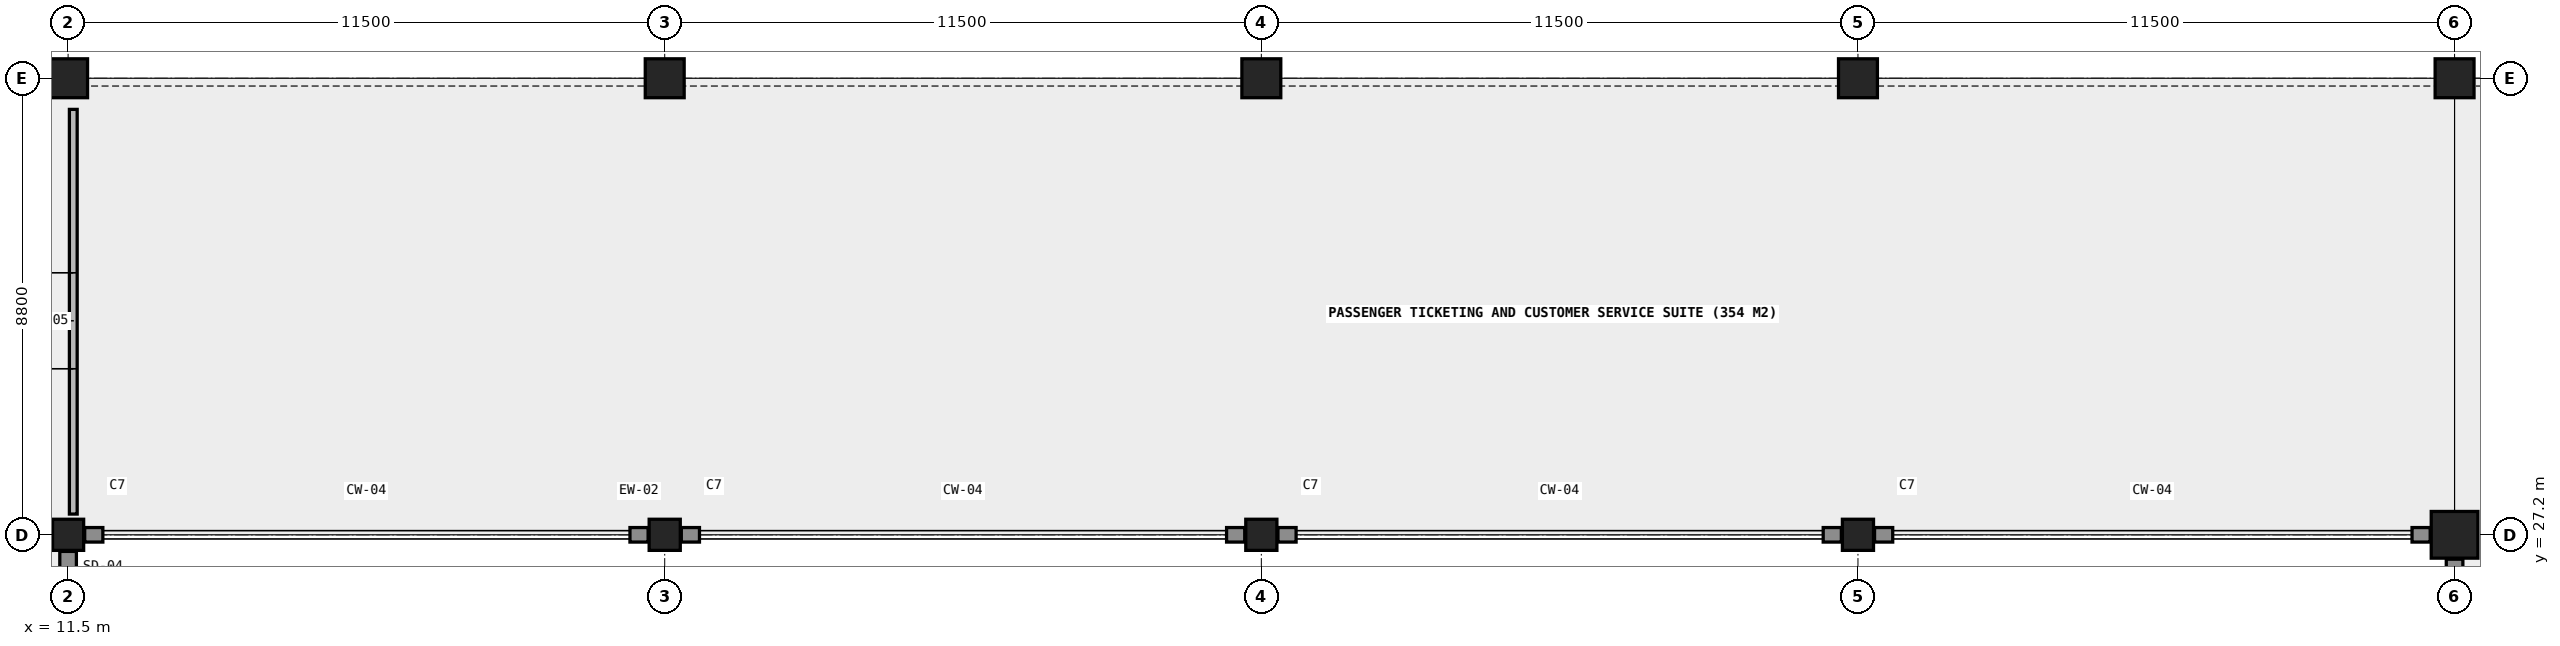
"""IFC4 building model, lengths in metres.
Left out: names, types, materials, properties, quantities, classifications, styles, units other than length and angle.
Written with IfcOpenShell. Run it as: python <this file> out.ifc"""

import sys

from ifc_helpers import new_model, si_unit, direction, frame, frame_2d, origin, origin_2d, place, context, subcontext, project, spatial, rectangle, circle, extrude, element, fill, save


model = new_model("IFC4")
c1 = context("Model", 3, precision=1e-05, world=origin(), true_north=direction((0.0, 1.0)))
c2 = subcontext(c1, "Body", "Model", "MODEL_VIEW")
j1 = project(units=[si_unit("LENGTHUNIT", "METRE"), si_unit("PLANEANGLEUNIT", "RADIAN")], contexts=[c1])
p1 = place(None, origin())
s1 = spatial("IfcSite", under=j1, at=p1, CompositionType="ELEMENT")
p2 = place(p1, origin())
s2 = spatial("IfcBuilding", under=s1, at=p2, CompositionType="ELEMENT")
p3 = place(p2, frame((0.0, 0.0, 4.2)))
s3 = spatial("IfcBuildingStorey", under=s2, at=p3, CompositionType="ELEMENT", Elevation=4.2)
p4 = place(p3, frame((11.5, 27.2, 0.0), z_axis=(0.0, 0.0, 1.0), x_axis=(1.0, 0.0, 0.0)))
e1 = element("IfcColumn", 1, at=p4, inside=s3, PredefinedType="COLUMN", context=c2, shape_type="SweptSolid", body=[
    extrude(rectangle(XDim=0.6, YDim=0.6, at=origin_2d()), origin(), (0.0, 0.0, 1.0), 4.2),
])
p5 = place(p3, frame((11.5, 36.0, 0.0), z_axis=(0.0, 0.0, 1.0), x_axis=(1.0, 0.0, 0.0)))
e2 = element("IfcColumn", 2, at=p5, inside=s3, PredefinedType="COLUMN", context=c2, shape_type="SweptSolid", body=[
    extrude(rectangle(XDim=0.75, YDim=0.75, at=origin_2d()), origin(), (0.0, 0.0, 1.0), 4.2),
])
p6 = place(p3, frame((23.0, 27.2, 0.0), z_axis=(0.0, 0.0, 1.0), x_axis=(1.0, 0.0, 0.0)))
e3 = element("IfcColumn", 3, at=p6, inside=s3, PredefinedType="COLUMN", context=c2, shape_type="SweptSolid", body=[
    extrude(rectangle(XDim=0.6, YDim=0.6, at=origin_2d()), origin(), (0.0, 0.0, 1.0), 4.2),
])
p7 = place(p3, frame((23.0, 36.0, 0.0), z_axis=(0.0, 0.0, 1.0), x_axis=(1.0, 0.0, 0.0)))
e4 = element("IfcColumn", 4, at=p7, inside=s3, PredefinedType="COLUMN", context=c2, shape_type="SweptSolid", body=[
    extrude(rectangle(XDim=0.75, YDim=0.75, at=origin_2d()), origin(), (0.0, 0.0, 1.0), 4.2),
])
p8 = place(p3, frame((34.5, 27.2, 0.0), z_axis=(0.0, 0.0, 1.0), x_axis=(1.0, 0.0, 0.0)))
e5 = element("IfcColumn", 5, at=p8, inside=s3, PredefinedType="COLUMN", context=c2, shape_type="SweptSolid", body=[
    extrude(rectangle(XDim=0.6, YDim=0.6, at=origin_2d()), origin(), (0.0, 0.0, 1.0), 4.2),
])
p9 = place(p3, frame((34.5, 36.0, 0.0), z_axis=(0.0, 0.0, 1.0), x_axis=(1.0, 0.0, 0.0)))
e6 = element("IfcColumn", 6, at=p9, inside=s3, PredefinedType="COLUMN", context=c2, shape_type="SweptSolid", body=[
    extrude(rectangle(XDim=0.75, YDim=0.75, at=origin_2d()), origin(), (0.0, 0.0, 1.0), 4.2),
])
p10 = place(p3, frame((46.0, 27.2, 0.0), z_axis=(0.0, 0.0, 1.0), x_axis=(1.0, 0.0, 0.0)))
e7 = element("IfcColumn", 7, at=p10, inside=s3, PredefinedType="COLUMN", context=c2, shape_type="SweptSolid", body=[
    extrude(rectangle(XDim=0.6, YDim=0.6, at=origin_2d()), origin(), (0.0, 0.0, 1.0), 4.2),
])
p11 = place(p3, frame((46.0, 36.0, 0.0), z_axis=(0.0, 0.0, 1.0), x_axis=(1.0, 0.0, 0.0)))
e8 = element("IfcColumn", 8, at=p11, inside=s3, PredefinedType="COLUMN", context=c2, shape_type="SweptSolid", body=[
    extrude(rectangle(XDim=0.75, YDim=0.75, at=origin_2d()), origin(), (0.0, 0.0, 1.0), 4.2),
])
p12 = place(p3, frame((57.5, 27.2, 0.0), z_axis=(0.0, 0.0, 1.0), x_axis=(1.0, 0.0, 0.0)))
e9 = element("IfcColumn", 9, at=p12, inside=s3, PredefinedType="COLUMN", context=c2, shape_type="SweptSolid", body=[
    extrude(circle(Radius=0.45, at=origin_2d()), origin(), (0.0, 0.0, 1.0), 4.2),
])
p13 = place(p3, frame((57.5, 36.0, 0.0), z_axis=(0.0, 0.0, 1.0), x_axis=(1.0, 0.0, 0.0)))
e10 = element("IfcColumn", 10, at=p13, inside=s3, PredefinedType="COLUMN", context=c2, shape_type="SweptSolid", body=[
    extrude(rectangle(XDim=0.75, YDim=0.75, at=origin_2d()), origin(), (0.0, 0.0, 1.0), 4.2),
])
p14 = place(p3, frame((11.5, 17.92, 0.0), z_axis=(0.0, 0.0, 1.0), x_axis=(0.0, 1.0, 0.0)))
e11 = element("IfcWall", 11, at=p14, inside=s3, PredefinedType="SOLIDWALL", context=c2, shape_type="SweptSolid", body=[
    extrude(rectangle(XDim=8.96, YDim=0.32, at=frame_2d((4.48, 0.0))), origin(), (0.0, 0.0, 1.0), 2.95),
])
p15 = place(p14, frame((1.787, 0.0, 0.85)))
e12 = element("IfcOpeningElement", 12, at=p15, cuts=e11, PredefinedType="OPENING", context=c2, shape_type="SweptSolid", body=[
    extrude(rectangle(XDim=1.8, YDim=1.8, at=frame_2d((0.9, 0.9))), frame((0.0, 0.17, 0.0), z_axis=(0.0, -1.0, 0.0), x_axis=(1.0, 0.0, 0.0)), (0.0, 0.0, 1.0), 0.34),
])
p16 = place(p14, frame((5.373, 0.0, 0.85)))
e13 = element("IfcOpeningElement", 13, at=p16, cuts=e11, PredefinedType="OPENING", context=c2, shape_type="SweptSolid", body=[
    extrude(rectangle(XDim=1.8, YDim=1.8, at=frame_2d((0.9, 0.9))), frame((0.0, 0.17, 0.0), z_axis=(0.0, -1.0, 0.0), x_axis=(1.0, 0.0, 0.0)), (0.0, 0.0, 1.0), 0.34),
])
for number, where, z_axis, x_axis in (
    (14, (11.82, 27.2, 0.0), (0.0, 0.0, 1.0), (1.0, 0.0, 0.0)),
    (15, (22.33, 27.2, 0.0), (0.0, 0.0, 1.0), (1.0, 0.0, 0.0)),
    (16, (23.32, 27.2, 0.0), (0.0, 0.0, 1.0), (1.0, 0.0, 0.0)),
    (17, (33.83, 27.2, 0.0), (0.0, 0.0, 1.0), (1.0, 0.0, 0.0)),
    (18, (34.82, 27.2, 0.0), (0.0, 0.0, 1.0), (1.0, 0.0, 0.0)),
    (19, (45.33, 27.2, 0.0), (0.0, 0.0, 1.0), (1.0, 0.0, 0.0)),
    (20, (46.32, 27.2, 0.0), (0.0, 0.0, 1.0), (1.0, 0.0, 0.0)),
):
    element("IfcWall", number, at=place(p3, frame(where, z_axis=z_axis, x_axis=x_axis)), inside=s3, PredefinedType="SOLIDWALL", context=c2, shape_type="SweptSolid", body=[
        extrude(rectangle(XDim=0.35, YDim=0.28, at=frame_2d((0.175, 0.0))), origin(), (0.0, 0.0, 1.0), 3.84),
    ])
p17 = place(p3, frame((56.68, 27.2, 0.0), z_axis=(0.0, 0.0, 1.0), x_axis=(1.0, 0.0, 0.0)))
e21 = element("IfcWall", 21, at=p17, inside=s3, PredefinedType="SOLIDWALL", context=c2, shape_type="SweptSolid", body=[
    extrude(rectangle(XDim=0.35, YDim=0.28, at=frame_2d((0.175, 0.0))), origin(), (0.0, 0.0, 1.0), 3.84),
])
p18 = place(p3, frame((57.5, 18.07, 0.0), z_axis=(0.0, 0.0, 1.0), x_axis=(0.0, 1.0, 0.0)))
e22 = element("IfcWall", 22, at=p18, inside=s3, PredefinedType="SOLIDWALL", context=c2, shape_type="SweptSolid", body=[
    extrude(rectangle(XDim=8.66, YDim=0.32, at=frame_2d((4.33, 0.0))), origin(), (0.0, 0.0, 1.0), 2.95),
])
p19 = place(p18, frame((1.42, 0.0, 0.85)))
e23 = element("IfcOpeningElement", 23, at=p19, cuts=e22, PredefinedType="OPENING", context=c2, shape_type="SweptSolid", body=[
    extrude(rectangle(XDim=2.2, YDim=1.8, at=frame_2d((1.1, 0.9))), frame((0.0, 0.17, 0.0), z_axis=(0.0, -1.0, 0.0), x_axis=(1.0, 0.0, 0.0)), (0.0, 0.0, 1.0), 0.34),
])
p20 = place(p18, frame((5.04, 0.0, 0.85)))
e24 = element("IfcOpeningElement", 24, at=p20, cuts=e22, PredefinedType="OPENING", context=c2, shape_type="SweptSolid", body=[
    extrude(rectangle(XDim=2.2, YDim=1.8, at=frame_2d((1.1, 0.9))), frame((0.0, 0.17, 0.0), z_axis=(0.0, -1.0, 0.0), x_axis=(1.0, 0.0, 0.0)), (0.0, 0.0, 1.0), 0.34),
])
p21 = place(p3, frame((11.6, 27.6, 0.0), z_axis=(0.0, 0.0, 1.0), x_axis=(0.0, 1.0, 0.0)))
e25 = element("IfcWall", 25, at=p21, inside=s3, PredefinedType="PARTITIONING", context=c2, shape_type="SweptSolid", body=[
    extrude(rectangle(XDim=7.8, YDim=0.15, at=frame_2d((3.9, 0.0))), origin(), (0.0, 0.0, 1.0), 2.95),
])
p22 = place(p21, frame((2.8, 0.0, 0.0)))
e26 = element("IfcOpeningElement", 26, at=p22, cuts=e25, PredefinedType="OPENING", context=c2, shape_type="SweptSolid", body=[
    extrude(rectangle(XDim=1.85, YDim=2.25, at=frame_2d((0.925, 1.125))), frame((0.0, 0.085, 0.0), z_axis=(0.0, -1.0, 0.0), x_axis=(1.0, 0.0, 0.0)), (0.0, 0.0, 1.0), 0.17),
])
p23 = place(p22, origin())
e27 = element("IfcDoor", 27, at=p23, inside=s3, OperationType="DOUBLE_DOOR_SINGLE_SWING", PredefinedType="DOOR", context=c2, shape_type="SweptSolid", body=[
    extrude(rectangle(XDim=1.85, YDim=2.25, at=frame_2d((0.925, 1.125))), frame((0.0, 0.025, 0.0), z_axis=(0.0, -1.0, 0.0), x_axis=(1.0, 0.0, 0.0)), (0.0, 0.0, 1.0), 0.05),
])
fill(e26, e27)
save(model, sys.argv[1])
